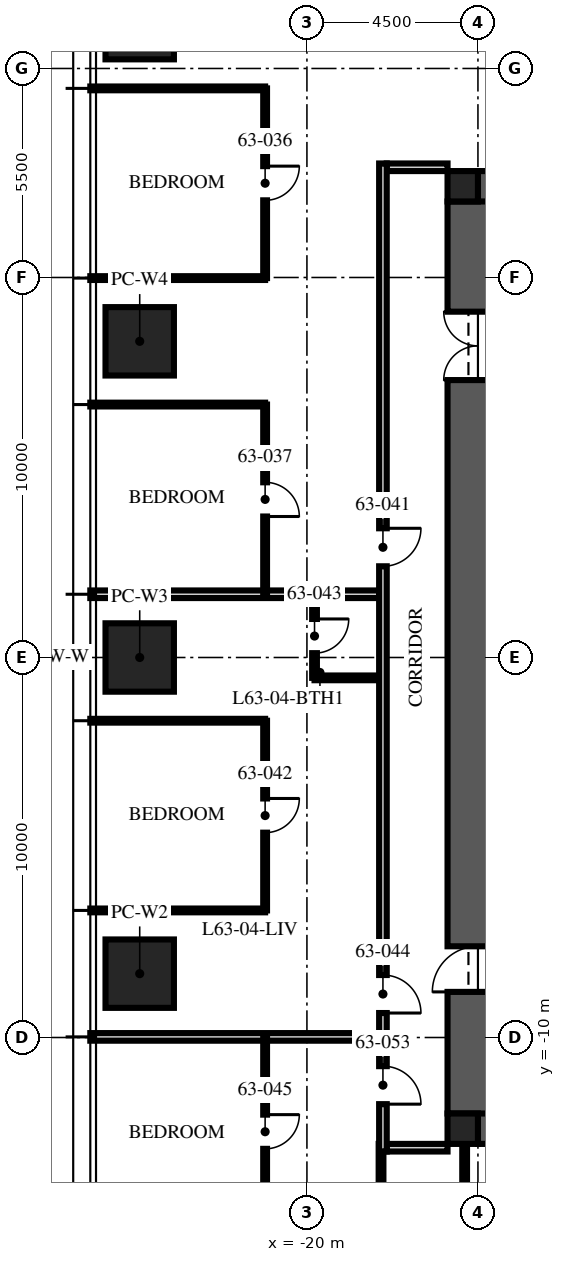
"""IFC4 building model, lengths in metres.
Left out: names, types, materials, properties, quantities, classifications, styles, units other than length and angle.
Written with IfcOpenShell. Run it as: python <this file> out.ifc"""

import sys

from ifc_helpers import new_model, si_unit, direction, frame, frame_2d, origin, origin_2d, place, context, subcontext, project, spatial, rectangle, extrude, element, fill, save


model = new_model("IFC4")
c1 = context("Model", 3, precision=1e-05, world=origin(), true_north=direction((0.0, 1.0)))
c2 = subcontext(c1, "Body", "Model", "MODEL_VIEW")
j1 = project(units=[si_unit("LENGTHUNIT", "METRE"), si_unit("PLANEANGLEUNIT", "RADIAN")], contexts=[c1])
p1 = place(None, origin())
s1 = spatial("IfcSite", under=j1, at=p1, CompositionType="ELEMENT")
p2 = place(p1, origin())
s2 = spatial("IfcBuilding", under=s1, at=p2, CompositionType="ELEMENT")
p3 = place(p2, frame((0.0, 0.0, 252.0)))
s3 = spatial("IfcBuildingStorey", under=s2, at=p3, CompositionType="ELEMENT", Elevation=252.0)
for number, where, z_axis, x_axis in (
    (1, (-15.5, 12.0, -0.25), (0.0, 0.0, 1.0), (1.0, 0.0, 0.0)),
    (2, (-15.5, -12.0, -0.25), (0.0, 0.0, 1.0), (1.0, 0.0, 0.0)),
):
    element("IfcWall", number, at=place(p3, frame(where, z_axis=z_axis, x_axis=x_axis)), inside=s3, PredefinedType="SHEAR", context=c2, shape_type="SweptSolid", body=[
        extrude(rectangle(XDim=31.0, YDim=1.6, at=frame_2d((15.5, 0.0))), origin(), (0.0, 0.0, 1.0), 3.75),
    ])
p4 = place(p3, frame((-15.5, -12.0, -0.25), z_axis=(0.0, 0.0, 1.0), x_axis=(0.0, 1.0, 0.0)))
e3 = element("IfcWall", 3, at=p4, inside=s3, PredefinedType="SHEAR", context=c2, shape_type="SweptSolid", body=[
    extrude(rectangle(XDim=24.0, YDim=1.6, at=frame_2d((12.0, 0.0))), origin(), (0.0, 0.0, 1.0), 3.75),
])
p5 = place(p4, frame((3.2, 0.0, 0.25)))
e4 = element("IfcOpeningElement", 4, at=p5, cuts=e3, PredefinedType="OPENING", context=c2, shape_type="SweptSolid", body=[
    extrude(rectangle(XDim=1.2, YDim=2.1, at=frame_2d((0.6, 1.05))), frame((0.0, 0.81, 0.0), z_axis=(0.0, -1.0, 0.0), x_axis=(1.0, 0.0, 0.0)), (0.0, 0.0, 1.0), 1.62),
])
p6 = place(p4, frame((19.3, 0.0, 0.25)))
e5 = element("IfcOpeningElement", 5, at=p6, cuts=e3, PredefinedType="OPENING", context=c2, shape_type="SweptSolid", body=[
    extrude(rectangle(XDim=1.8, YDim=2.1, at=frame_2d((0.9, 1.05))), frame((0.0, 0.81, 0.0), z_axis=(0.0, -1.0, 0.0), x_axis=(1.0, 0.0, 0.0)), (0.0, 0.0, 1.0), 1.62),
])
for number, where, z_axis, x_axis in (
    (6, (-15.9, 12.4, -0.25), (0.0, 0.0, 1.0), (1.0, 0.0, 0.0)),
    (7, (-15.9, -12.4, -0.25), (0.0, 0.0, 1.0), (1.0, 0.0, 0.0)),
):
    element("IfcColumn", number, at=place(p3, frame(where, z_axis=z_axis, x_axis=x_axis)), inside=s3, PredefinedType="COLUMN", context=c2, shape_type="SweptSolid", body=[
        extrude(rectangle(XDim=0.8, YDim=0.8, at=origin_2d()), origin(), (0.0, 0.0, 1.0), 3.75),
    ])
for number, where, z_axis, x_axis in (
    (8, (-24.4, -8.32, 0.0), (0.0, 0.0, 1.0), (0.0, 1.0, 0.0)),
    (9, (-24.4, 0.0, 0.0), (0.0, 0.0, 1.0), (0.0, 1.0, 0.0)),
    (10, (-24.4, 8.32, 0.0), (0.0, 0.0, 1.0), (0.0, 1.0, 0.0)),
    (11, (-24.4, 16.64, 0.0), (0.0, 0.0, 1.0), (0.0, 1.0, 0.0)),
):
    element("IfcColumn", number, at=place(p3, frame(where, z_axis=z_axis, x_axis=x_axis)), inside=s3, PredefinedType="COLUMN", context=c2, shape_type="SweptSolid", body=[
        extrude(rectangle(XDim=1.8, YDim=1.8, at=origin_2d()), origin(), (0.0, 0.0, 1.0), 3.75),
    ])
for number, where, z_axis, x_axis in (
    (12, (-16.3, 12.9, 0.0), (0.0, 0.0, 1.0), (-1.0, 0.0, 0.0)),
    (13, (-16.3, -12.9, 0.0), (0.0, 0.0, 1.0), (-1.0, 0.0, 0.0)),
):
    element("IfcWall", number, at=place(p3, frame(where, z_axis=z_axis, x_axis=x_axis)), inside=s3, PredefinedType="PARTITIONING", context=c2, shape_type="SweptSolid", body=[
        extrude(rectangle(XDim=1.6, YDim=0.2, at=frame_2d((0.8, 0.0))), origin(), (0.0, 0.0, 1.0), 2.3),
    ])
for number, where, z_axis, x_axis in (
    (14, (-21.1, 14.976, 0.0), (0.0, 0.0, 1.0), (-1.0, 0.0, 0.0)),
    (15, (-21.1, 9.984, 0.0), (0.0, 0.0, 1.0), (-1.0, 0.0, 0.0)),
    (16, (-21.1, 6.656, 0.0), (0.0, 0.0, 1.0), (-1.0, 0.0, 0.0)),
):
    element("IfcWall", number, at=place(p3, frame(where, z_axis=z_axis, x_axis=x_axis)), inside=s3, PredefinedType="PARTITIONING", context=c2, shape_type="SweptSolid", body=[
        extrude(rectangle(XDim=4.6, YDim=0.1, at=frame_2d((2.3, 0.0))), origin(), (0.0, 0.0, 1.0), 2.91),
    ])
p7 = place(p3, frame((-18.1, 1.664, 0.0), z_axis=(0.0, 0.0, 1.0), x_axis=(-1.0, 0.0, 0.0)))
e17 = element("IfcWall", 17, at=p7, inside=s3, PredefinedType="PARTITIONING", context=c2, shape_type="SweptSolid", body=[
    extrude(rectangle(XDim=7.6, YDim=0.2, at=frame_2d((3.8, 0.0))), origin(), (0.0, 0.0, 1.0), 2.91),
])
for number, where, z_axis, x_axis in (
    (18, (-21.1, -1.664, 0.0), (0.0, 0.0, 1.0), (-1.0, 0.0, 0.0)),
    (19, (-21.1, -6.656, 0.0), (0.0, 0.0, 1.0), (-1.0, 0.0, 0.0)),
):
    element("IfcWall", number, at=place(p3, frame(where, z_axis=z_axis, x_axis=x_axis)), inside=s3, PredefinedType="PARTITIONING", context=c2, shape_type="SweptSolid", body=[
        extrude(rectangle(XDim=4.6, YDim=0.1, at=frame_2d((2.3, 0.0))), origin(), (0.0, 0.0, 1.0), 2.91),
    ])
p8 = place(p3, frame((-18.1, -9.984, 0.0), z_axis=(0.0, 0.0, 1.0), x_axis=(-1.0, 0.0, 0.0)))
e20 = element("IfcWall", 20, at=p8, inside=s3, PredefinedType="PARTITIONING", context=c2, shape_type="SweptSolid", body=[
    extrude(rectangle(XDim=7.6, YDim=0.2, at=frame_2d((3.8, 0.0))), origin(), (0.0, 0.0, 1.0), 2.91),
])
p9 = place(p3, frame((-21.1, 14.976, 0.0), z_axis=(0.0, 0.0, 1.0), x_axis=(0.0, -1.0, 0.0)))
e21 = element("IfcWall", 21, at=p9, inside=s3, PredefinedType="PARTITIONING", context=c2, shape_type="SweptSolid", body=[
    extrude(rectangle(XDim=4.992, YDim=0.1, at=frame_2d((2.496, 0.0))), origin(), (0.0, 0.0, 1.0), 2.81),
])
p10 = place(p9, frame((2.046, 0.0, 0.0)))
e22 = element("IfcOpeningElement", 22, at=p10, cuts=e21, PredefinedType="OPENING", context=c2, shape_type="SweptSolid", body=[
    extrude(rectangle(XDim=0.9, YDim=2.1, at=frame_2d((0.45, 1.05))), frame((0.0, 0.06, 0.0), z_axis=(0.0, -1.0, 0.0), x_axis=(1.0, 0.0, 0.0)), (0.0, 0.0, 1.0), 0.12),
])
p11 = place(p3, frame((-21.1, 6.656, 0.0), z_axis=(0.0, 0.0, 1.0), x_axis=(0.0, -1.0, 0.0)))
e23 = element("IfcWall", 23, at=p11, inside=s3, PredefinedType="PARTITIONING", context=c2, shape_type="SweptSolid", body=[
    extrude(rectangle(XDim=4.992, YDim=0.1, at=frame_2d((2.496, 0.0))), origin(), (0.0, 0.0, 1.0), 2.81),
])
p12 = place(p11, frame((2.046, 0.0, 0.0)))
e24 = element("IfcOpeningElement", 24, at=p12, cuts=e23, PredefinedType="OPENING", context=c2, shape_type="SweptSolid", body=[
    extrude(rectangle(XDim=0.9, YDim=2.1, at=frame_2d((0.45, 1.05))), frame((0.0, 0.06, 0.0), z_axis=(0.0, -1.0, 0.0), x_axis=(1.0, 0.0, 0.0)), (0.0, 0.0, 1.0), 0.12),
])
p13 = place(p3, frame((-21.1, -1.664, 0.0), z_axis=(0.0, 0.0, 1.0), x_axis=(0.0, -1.0, 0.0)))
e25 = element("IfcWall", 25, at=p13, inside=s3, PredefinedType="PARTITIONING", context=c2, shape_type="SweptSolid", body=[
    extrude(rectangle(XDim=4.992, YDim=0.1, at=frame_2d((2.496, 0.0))), origin(), (0.0, 0.0, 1.0), 2.81),
])
p14 = place(p13, frame((2.046, 0.0, 0.0)))
e26 = element("IfcOpeningElement", 26, at=p14, cuts=e25, PredefinedType="OPENING", context=c2, shape_type="SweptSolid", body=[
    extrude(rectangle(XDim=0.9, YDim=2.1, at=frame_2d((0.45, 1.05))), frame((0.0, 0.06, 0.0), z_axis=(0.0, -1.0, 0.0), x_axis=(1.0, 0.0, 0.0)), (0.0, 0.0, 1.0), 0.12),
])
p15 = place(p3, frame((-19.8, 1.664, 0.0), z_axis=(0.0, 0.0, 1.0), x_axis=(0.0, -1.0, 0.0)))
e27 = element("IfcWall", 27, at=p15, inside=s3, PredefinedType="PARTITIONING", context=c2, shape_type="SweptSolid", body=[
    extrude(rectangle(XDim=2.2, YDim=0.125, at=frame_2d((1.1, 0.0))), origin(), (0.0, 0.0, 1.0), 2.6),
])
p16 = place(p15, frame((0.65, 0.0, 0.0)))
e28 = element("IfcOpeningElement", 28, at=p16, cuts=e27, PredefinedType="OPENING", context=c2, shape_type="SweptSolid", body=[
    extrude(rectangle(XDim=0.9, YDim=2.1, at=frame_2d((0.45, 1.05))), frame((0.0, 0.073, 0.0), z_axis=(0.0, -1.0, 0.0), x_axis=(1.0, 0.0, 0.0)), (0.0, 0.0, 1.0), 0.145),
])
p17 = place(p3, frame((-18.1, -0.536, 0.0), z_axis=(0.0, 0.0, 1.0), x_axis=(-1.0, 0.0, 0.0)))
e29 = element("IfcWall", 29, at=p17, inside=s3, PredefinedType="PARTITIONING", context=c2, shape_type="SweptSolid", body=[
    extrude(rectangle(XDim=1.7, YDim=0.125, at=frame_2d((0.85, 0.0))), origin(), (0.0, 0.0, 1.0), 3.5),
])
p18 = place(p3, frame((-21.1, -9.984, 0.0), z_axis=(0.0, 0.0, 1.0), x_axis=(0.0, -1.0, 0.0)))
e30 = element("IfcWall", 30, at=p18, inside=s3, PredefinedType="PARTITIONING", context=c2, shape_type="SweptSolid", body=[
    extrude(rectangle(XDim=4.992, YDim=0.1, at=frame_2d((2.496, 0.0))), origin(), (0.0, 0.0, 1.0), 2.81),
])
p19 = place(p18, frame((2.046, 0.0, 0.0)))
e31 = element("IfcOpeningElement", 31, at=p19, cuts=e30, PredefinedType="OPENING", context=c2, shape_type="SweptSolid", body=[
    extrude(rectangle(XDim=0.9, YDim=2.1, at=frame_2d((0.45, 1.05))), frame((0.0, 0.06, 0.0), z_axis=(0.0, -1.0, 0.0), x_axis=(1.0, 0.0, 0.0)), (0.0, 0.0, 1.0), 0.12),
])
for number, where, z_axis, x_axis in (
    (32, (-18.05, -12.8, 0.0), (0.0, 0.0, 1.0), (0.0, -1.0, 0.0)),
    (33, (-15.85, -12.8, 0.0), (0.0, 0.0, 1.0), (0.0, -1.0, 0.0)),
):
    element("IfcWall", number, at=place(p3, frame(where, z_axis=z_axis, x_axis=x_axis)), inside=s3, PredefinedType="PARTITIONING", context=c2, shape_type="SweptSolid", body=[
        extrude(rectangle(XDim=2.8, YDim=0.125, at=frame_2d((1.4, 0.0))), origin(), (0.0, 0.0, 1.0), 2.3),
    ])
p20 = place(p3, frame((-18.0, 13.0, 0.0), z_axis=(0.0, 0.0, 1.0), x_axis=(0.0, -1.0, 0.0)))
e34 = element("IfcWall", 34, at=p20, inside=s3, PredefinedType="PARTITIONING", context=c2, shape_type="SweptSolid", body=[
    extrude(rectangle(XDim=26.0, YDim=0.2, at=frame_2d((13.0, 0.0))), origin(), (0.0, 0.0, 1.0), 2.6),
])
p21 = place(p20, frame((9.6, 0.0, 0.0)))
e35 = element("IfcOpeningElement", 35, at=p21, cuts=e34, PredefinedType="OPENING", context=c2, shape_type="SweptSolid", body=[
    extrude(rectangle(XDim=1.0, YDim=2.2, at=frame_2d((0.5, 1.1))), frame((0.0, 0.11, 0.0), z_axis=(0.0, -1.0, 0.0), x_axis=(1.0, 0.0, 0.0)), (0.0, 0.0, 1.0), 0.22),
])
p22 = place(p20, frame((21.356, 0.0, 0.0)))
e36 = element("IfcOpeningElement", 36, at=p22, cuts=e34, PredefinedType="OPENING", context=c2, shape_type="SweptSolid", body=[
    extrude(rectangle(XDim=1.0, YDim=2.2, at=frame_2d((0.5, 1.1))), frame((0.0, 0.11, 0.0), z_axis=(0.0, -1.0, 0.0), x_axis=(1.0, 0.0, 0.0)), (0.0, 0.0, 1.0), 0.22),
])
p23 = place(p20, frame((23.754, 0.0, 0.0)))
e37 = element("IfcOpeningElement", 37, at=p23, cuts=e34, PredefinedType="OPENING", context=c2, shape_type="SweptSolid", body=[
    extrude(rectangle(XDim=1.0, YDim=2.2, at=frame_2d((0.5, 1.1))), frame((0.0, 0.11, 0.0), z_axis=(0.0, -1.0, 0.0), x_axis=(1.0, 0.0, 0.0)), (0.0, 0.0, 1.0), 0.22),
])
p24 = place(p5, origin())
e38 = element("IfcDoor", 38, at=p24, inside=s3, OperationType="SINGLE_SWING_LEFT", PredefinedType="DOOR", context=c2, shape_type="SweptSolid", body=[
    extrude(rectangle(XDim=1.2, YDim=2.1, at=frame_2d((0.6, 1.05))), frame((0.0, 0.025, 0.0), z_axis=(0.0, -1.0, 0.0), x_axis=(1.0, 0.0, 0.0)), (0.0, 0.0, 1.0), 0.05),
])
fill(e4, e38)
p25 = place(p6, origin())
e39 = element("IfcDoor", 39, at=p25, inside=s3, OperationType="DOUBLE_DOOR_SINGLE_SWING", PredefinedType="DOOR", context=c2, shape_type="SweptSolid", body=[
    extrude(rectangle(XDim=1.8, YDim=2.1, at=frame_2d((0.9, 1.05))), frame((0.0, 0.025, 0.0), z_axis=(0.0, -1.0, 0.0), x_axis=(1.0, 0.0, 0.0)), (0.0, 0.0, 1.0), 0.05),
])
fill(e5, e39)
p26 = place(p10, origin())
e40 = element("IfcDoor", 40, at=p26, inside=s3, OperationType="SINGLE_SWING_LEFT", PredefinedType="DOOR", context=c2, shape_type="SweptSolid", body=[
    extrude(rectangle(XDim=0.9, YDim=2.1, at=frame_2d((0.45, 1.05))), frame((0.0, 0.025, 0.0), z_axis=(0.0, -1.0, 0.0), x_axis=(1.0, 0.0, 0.0)), (0.0, 0.0, 1.0), 0.05),
])
fill(e22, e40)
p27 = place(p12, origin())
e41 = element("IfcDoor", 41, at=p27, inside=s3, OperationType="SINGLE_SWING_RIGHT", PredefinedType="DOOR", context=c2, shape_type="SweptSolid", body=[
    extrude(rectangle(XDim=0.9, YDim=2.1, at=frame_2d((0.45, 1.05))), frame((0.0, 0.025, 0.0), z_axis=(0.0, -1.0, 0.0), x_axis=(1.0, 0.0, 0.0)), (0.0, 0.0, 1.0), 0.05),
])
fill(e24, e41)
p28 = place(p21, origin())
e42 = element("IfcDoor", 42, at=p28, inside=s3, OperationType="SINGLE_SWING_LEFT", PredefinedType="DOOR", context=c2, shape_type="SweptSolid", body=[
    extrude(rectangle(XDim=1.0, YDim=2.2, at=frame_2d((0.5, 1.1))), frame((0.0, 0.025, 0.0), z_axis=(0.0, -1.0, 0.0), x_axis=(1.0, 0.0, 0.0)), (0.0, 0.0, 1.0), 0.05),
])
fill(e35, e42)
p29 = place(p14, origin())
e43 = element("IfcDoor", 43, at=p29, inside=s3, OperationType="SINGLE_SWING_LEFT", PredefinedType="DOOR", context=c2, shape_type="SweptSolid", body=[
    extrude(rectangle(XDim=0.9, YDim=2.1, at=frame_2d((0.45, 1.05))), frame((0.0, 0.025, 0.0), z_axis=(0.0, -1.0, 0.0), x_axis=(1.0, 0.0, 0.0)), (0.0, 0.0, 1.0), 0.05),
])
fill(e26, e43)
p30 = place(p16, origin())
e44 = element("IfcDoor", 44, at=p30, inside=s3, OperationType="SINGLE_SWING_LEFT", PredefinedType="DOOR", context=c2, shape_type="SweptSolid", body=[
    extrude(rectangle(XDim=0.9, YDim=2.1, at=frame_2d((0.45, 1.05))), frame((0.0, 0.025, 0.0), z_axis=(0.0, -1.0, 0.0), x_axis=(1.0, 0.0, 0.0)), (0.0, 0.0, 1.0), 0.05),
])
fill(e28, e44)
p31 = place(p22, origin())
e45 = element("IfcDoor", 45, at=p31, inside=s3, OperationType="SINGLE_SWING_RIGHT", PredefinedType="DOOR", context=c2, shape_type="SweptSolid", body=[
    extrude(rectangle(XDim=1.0, YDim=2.2, at=frame_2d((0.5, 1.1))), frame((0.0, 0.025, 0.0), z_axis=(0.0, -1.0, 0.0), x_axis=(1.0, 0.0, 0.0)), (0.0, 0.0, 1.0), 0.05),
])
fill(e36, e45)
p32 = place(p19, origin())
e46 = element("IfcDoor", 46, at=p32, inside=s3, OperationType="SINGLE_SWING_LEFT", PredefinedType="DOOR", context=c2, shape_type="SweptSolid", body=[
    extrude(rectangle(XDim=0.9, YDim=2.1, at=frame_2d((0.45, 1.05))), frame((0.0, 0.025, 0.0), z_axis=(0.0, -1.0, 0.0), x_axis=(1.0, 0.0, 0.0)), (0.0, 0.0, 1.0), 0.05),
])
fill(e31, e46)
p33 = place(p23, origin())
e47 = element("IfcDoor", 47, at=p33, inside=s3, OperationType="SINGLE_SWING_RIGHT", PredefinedType="DOOR", context=c2, shape_type="SweptSolid", body=[
    extrude(rectangle(XDim=1.0, YDim=2.2, at=frame_2d((0.5, 1.1))), frame((0.0, 0.025, 0.0), z_axis=(0.0, -1.0, 0.0), x_axis=(1.0, 0.0, 0.0)), (0.0, 0.0, 1.0), 0.05),
])
fill(e37, e47)
save(model, sys.argv[1])
